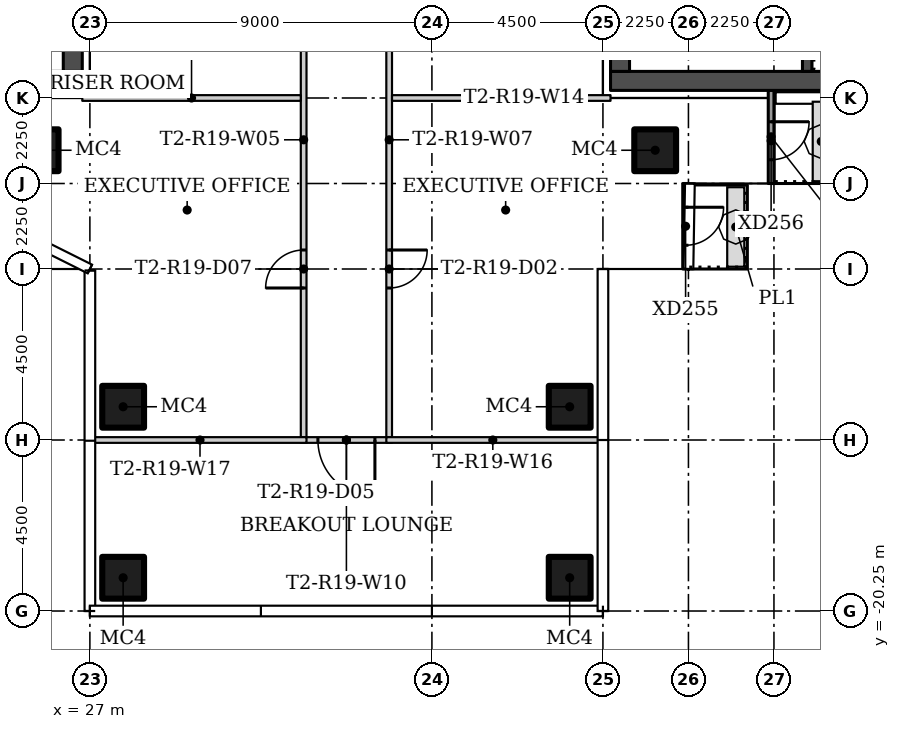
"""IFC4 building model, lengths in metres.
Left out: names, types, materials, properties, quantities, classifications, styles, units other than length and angle.
Written with IfcOpenShell. Run it as: python <this file> out.ifc"""

import sys

from ifc_helpers import new_model, si_unit, direction, frame, frame_2d, origin, origin_2d, place, context, subcontext, project, spatial, rectangle, hollow_rectangle, extrude, element, fill, save


model = new_model("IFC4")
c1 = context("Model", 3, precision=1e-05, world=origin(), true_north=direction((0.0, 1.0)))
c2 = subcontext(c1, "Body", "Model", "MODEL_VIEW")
j1 = project(units=[si_unit("LENGTHUNIT", "METRE"), si_unit("PLANEANGLEUNIT", "RADIAN")], contexts=[c1])
p1 = place(None, origin())
s1 = spatial("IfcSite", under=j1, at=p1, CompositionType="ELEMENT")
p2 = place(p1, origin())
s2 = spatial("IfcBuilding", under=s1, at=p2, CompositionType="ELEMENT")
p3 = place(p2, frame((0.0, 0.0, 170.1)))
s3 = spatial("IfcBuildingStorey", under=s2, at=p3, CompositionType="ELEMENT", Elevation=170.1)
for number, where in (
    (1, (25.625, -8.125, 0.0)),
    (2, (41.875, -8.125, 0.0)),
    (3, (39.625, -14.875, 0.0)),
    (4, (39.625, -19.375, 0.0)),
    (5, (27.875, -14.875, 0.0)),
    (6, (27.875, -19.375, 0.0)),
):
    element("IfcColumn", number, at=place(p3, frame(where)), inside=s3, PredefinedType="COLUMN", context=c2, shape_type="SweptSolid", body=[
        extrude(hollow_rectangle(XDim=1.1, YDim=1.1, WallThickness=0.04, at=origin_2d()), origin(), (0.0, 0.0, 1.0), 3.55),
    ])
p4 = place(p3, frame((32.625, -15.675, 0.0), z_axis=(0.0, 0.0, 1.0), x_axis=(0.0, 1.0, 0.0)))
e7 = element("IfcWall", 7, at=p4, inside=s3, PredefinedType="PARTITIONING", context=c2, shape_type="SweptSolid", body=[
    extrude(rectangle(XDim=15.65, YDim=0.15, at=frame_2d((7.825, 0.0))), origin(), (0.0, 0.0, 1.0), 3.55),
])
p5 = place(p4, frame((11.875, 0.0, 0.0)))
e8 = element("IfcOpeningElement", 8, at=p5, cuts=e7, PredefinedType="OPENING", context=c2, shape_type="SweptSolid", body=[
    extrude(rectangle(XDim=0.9, YDim=2.1, at=frame_2d((0.45, 1.05))), frame((0.0, 0.085, 0.0), z_axis=(0.0, -1.0, 0.0), x_axis=(1.0, 0.0, 0.0)), (0.0, 0.0, 1.0), 0.17),
])
p6 = place(p4, frame((3.925, 0.0, 0.0)))
e9 = element("IfcOpeningElement", 9, at=p6, cuts=e7, PredefinedType="OPENING", context=c2, shape_type="SweptSolid", body=[
    extrude(rectangle(XDim=1.0, YDim=2.4, at=frame_2d((0.5, 1.2))), frame((0.0, 0.085, 0.0), z_axis=(0.0, -1.0, 0.0), x_axis=(1.0, 0.0, 0.0)), (0.0, 0.0, 1.0), 0.17),
])
p7 = place(p3, frame((34.875, -0.025, 0.0), z_axis=(0.0, 0.0, 1.0), x_axis=(0.0, -1.0, 0.0)))
e10 = element("IfcWall", 10, at=p7, inside=s3, PredefinedType="PARTITIONING", context=c2, shape_type="SweptSolid", body=[
    extrude(rectangle(XDim=15.65, YDim=0.15, at=frame_2d((7.825, 0.0))), origin(), (0.0, 0.0, 1.0), 3.55),
])
p8 = place(p7, frame((10.725, 0.0, 0.0)))
e11 = element("IfcOpeningElement", 11, at=p8, cuts=e10, PredefinedType="OPENING", context=c2, shape_type="SweptSolid", body=[
    extrude(rectangle(XDim=1.0, YDim=2.4, at=frame_2d((0.5, 1.2))), frame((0.0, 0.085, 0.0), z_axis=(0.0, -1.0, 0.0), x_axis=(1.0, 0.0, 0.0)), (0.0, 0.0, 1.0), 0.17),
])
p9 = place(p7, frame((2.875, 0.0, 0.0)))
e12 = element("IfcOpeningElement", 12, at=p9, cuts=e10, PredefinedType="OPENING", context=c2, shape_type="SweptSolid", body=[
    extrude(rectangle(XDim=0.9, YDim=2.1, at=frame_2d((0.45, 1.05))), frame((0.0, 0.085, 0.0), z_axis=(0.0, -1.0, 0.0), x_axis=(1.0, 0.0, 0.0)), (0.0, 0.0, 1.0), 0.17),
])
p10 = place(p3, frame((34.95, -15.75, 0.0), z_axis=(0.0, 0.0, 1.0), x_axis=(-1.0, 0.0, 0.0)))
e13 = element("IfcWall", 13, at=p10, inside=s3, PredefinedType="PARTITIONING", context=c2, shape_type="SweptSolid", body=[
    extrude(rectangle(XDim=2.4, YDim=0.15, at=frame_2d((1.2, 0.0))), origin(), (0.0, 0.0, 1.0), 3.55),
])
p11 = place(p10, frame((0.45, 0.0, 0.0)))
e14 = element("IfcOpeningElement", 14, at=p11, cuts=e13, PredefinedType="OPENING", context=c2, shape_type="SweptSolid", body=[
    extrude(rectangle(XDim=1.5, YDim=2.1, at=frame_2d((0.75, 1.05))), frame((0.0, 0.085, 0.0), z_axis=(0.0, -1.0, 0.0), x_axis=(1.0, 0.0, 0.0)), (0.0, 0.0, 1.0), 0.17),
])
for number, where in (
    (15, (34.95, -6.75, 0.0)),
    (16, (26.8, -6.75, 0.0)),
):
    element("IfcWall", number, at=place(p3, frame(where)), inside=s3, PredefinedType="PARTITIONING", context=c2, shape_type="SweptSolid", body=[
        extrude(rectangle(XDim=5.75, YDim=0.15, at=frame_2d((2.875, 0.0))), origin(), (0.0, 0.0, 1.0), 3.55),
    ])
for number, where in (
    (17, (34.8, -15.75, 0.0)),
    (18, (27.095, -15.75, 0.0)),
):
    element("IfcWall", number, at=place(p3, frame(where)), inside=s3, PredefinedType="PARTITIONING", context=c2, shape_type="SweptSolid", body=[
        extrude(rectangle(XDim=5.605, YDim=0.15, at=frame_2d((2.802, 0.0))), origin(), (0.0, 0.0, 1.0), 3.55),
    ])
p12 = place(p3, frame((42.675, -9.0, 0.0), z_axis=(0.0, 0.0, 1.0), x_axis=(0.0, -1.0, 0.0)))
e19 = element("IfcWall", 19, at=p12, inside=s3, PredefinedType="SOLIDWALL", context=c2, shape_type="SweptSolid", body=[
    extrude(rectangle(XDim=2.25, YDim=0.15, at=frame_2d((1.125, 0.0))), origin(), (0.0, 0.0, 1.0), 3.45),
])
p13 = place(p12, frame((0.625, 0.0, 0.0)))
e20 = element("IfcOpeningElement", 20, at=p13, cuts=e19, PredefinedType="OPENING", context=c2, shape_type="SweptSolid", body=[
    extrude(rectangle(XDim=1.0, YDim=2.4, at=frame_2d((0.5, 1.2))), frame((0.0, 0.085, 0.0), z_axis=(0.0, -1.0, 0.0), x_axis=(1.0, 0.0, 0.0)), (0.0, 0.0, 1.0), 0.17),
])
p14 = place(p3, frame((44.925, -6.543, 0.0), z_axis=(0.0, 0.0, 1.0), x_axis=(0.0, -1.0, 0.0)))
e21 = element("IfcWall", 21, at=p14, inside=s3, PredefinedType="SOLIDWALL", context=c2, shape_type="SweptSolid", body=[
    extrude(rectangle(XDim=2.457, YDim=0.15, at=frame_2d((1.229, 0.0))), origin(), (0.0, 0.0, 1.0), 3.45),
])
p15 = place(p14, frame((0.832, 0.0, 0.0)))
e22 = element("IfcOpeningElement", 22, at=p15, cuts=e21, PredefinedType="OPENING", context=c2, shape_type="SweptSolid", body=[
    extrude(rectangle(XDim=1.0, YDim=2.4, at=frame_2d((0.5, 1.2))), frame((0.0, 0.085, 0.0), z_axis=(0.0, -1.0, 0.0), x_axis=(1.0, 0.0, 0.0)), (0.0, 0.0, 1.0), 0.17),
])
p16 = place(p3, frame((13.7, -6.3, 0.0)))
e23 = element("IfcWall", 23, at=p16, inside=s3, PredefinedType="SHEAR", context=c2, shape_type="SweptSolid", body=[
    extrude(rectangle(XDim=13.1, YDim=0.5, at=frame_2d((6.55, 0.0))), origin(), (0.0, 0.0, 1.0), 3.55),
])
p17 = place(p3, frame((26.55, 6.05, 0.0), z_axis=(0.0, 0.0, 1.0), x_axis=(0.0, -1.0, 0.0)))
e24 = element("IfcWall", 24, at=p17, inside=s3, PredefinedType="SHEAR", context=c2, shape_type="SweptSolid", body=[
    extrude(rectangle(XDim=12.1, YDim=0.5, at=frame_2d((6.05, 0.0))), origin(), (0.0, 0.0, 1.0), 3.55),
])
p18 = place(p17, frame((10.1, 0.0, 0.0)))
e25 = element("IfcOpeningElement", 25, at=p18, cuts=e24, PredefinedType="OPENING", context=c2, shape_type="SweptSolid", body=[
    extrude(rectangle(XDim=1.2, YDim=2.1, at=frame_2d((0.6, 1.05))), frame((0.0, 0.26, 0.0), z_axis=(0.0, -1.0, 0.0), x_axis=(1.0, 0.0, 0.0)), (0.0, 0.0, 1.0), 0.52),
])
p19 = place(p17, frame((3.9, 0.0, 0.0)))
e26 = element("IfcOpeningElement", 26, at=p19, cuts=e24, PredefinedType="OPENING", context=c2, shape_type="SweptSolid", body=[
    extrude(rectangle(XDim=1.8, YDim=2.4, at=frame_2d((0.9, 1.2))), frame((0.0, 0.26, 0.0), z_axis=(0.0, -1.0, 0.0), x_axis=(1.0, 0.0, 0.0)), (0.0, 0.0, 1.0), 0.52),
])
p20 = place(p3, frame((53.8, -6.3, 0.0), z_axis=(0.0, 0.0, 1.0), x_axis=(-1.0, 0.0, 0.0)))
e27 = element("IfcWall", 27, at=p20, inside=s3, PredefinedType="SHEAR", context=c2, shape_type="SweptSolid", body=[
    extrude(rectangle(XDim=13.1, YDim=0.5, at=frame_2d((6.55, 0.0))), origin(), (0.0, 0.0, 1.0), 3.55),
])
p21 = place(p3, frame((40.95, -6.05, 0.0), z_axis=(0.0, 0.0, 1.0), x_axis=(0.0, 1.0, 0.0)))
e28 = element("IfcWall", 28, at=p21, inside=s3, PredefinedType="SHEAR", context=c2, shape_type="SweptSolid", body=[
    extrude(rectangle(XDim=12.1, YDim=0.5, at=frame_2d((6.05, 0.0))), origin(), (0.0, 0.0, 1.0), 3.55),
])
p22 = place(p21, frame((0.8, 0.0, 0.0)))
e29 = element("IfcOpeningElement", 29, at=p22, cuts=e28, PredefinedType="OPENING", context=c2, shape_type="SweptSolid", body=[
    extrude(rectangle(XDim=1.2, YDim=2.1, at=frame_2d((0.6, 1.05))), frame((0.0, 0.26, 0.0), z_axis=(0.0, -1.0, 0.0), x_axis=(1.0, 0.0, 0.0)), (0.0, 0.0, 1.0), 0.52),
])
p23 = place(p21, frame((6.4, 0.0, 0.0)))
e30 = element("IfcOpeningElement", 30, at=p23, cuts=e28, PredefinedType="OPENING", context=c2, shape_type="SweptSolid", body=[
    extrude(rectangle(XDim=1.8, YDim=2.4, at=frame_2d((0.9, 1.2))), frame((0.0, 0.26, 0.0), z_axis=(0.0, -1.0, 0.0), x_axis=(1.0, 0.0, 0.0)), (0.0, 0.0, 1.0), 0.52),
])
p24 = place(p3, frame((45.875, -6.05, 0.0), z_axis=(0.0, 0.0, 1.0), x_axis=(0.0, 1.0, 0.0)))
e31 = element("IfcWall", 31, at=p24, inside=s3, PredefinedType="SHEAR", context=c2, shape_type="SweptSolid", body=[
    extrude(rectangle(XDim=2.55, YDim=0.25, at=frame_2d((1.275, 0.0))), origin(), (0.0, 0.0, 1.0), 3.55),
])
p25 = place(p8, origin())
e32 = element("IfcDoor", 32, at=p25, inside=s3, OperationType="SINGLE_SWING_RIGHT", PredefinedType="DOOR", context=c2, shape_type="SweptSolid", body=[
    extrude(rectangle(XDim=1.0, YDim=2.4, at=frame_2d((0.5, 1.2))), frame((0.0, 0.025, 0.0), z_axis=(0.0, -1.0, 0.0), x_axis=(1.0, 0.0, 0.0)), (0.0, 0.0, 1.0), 0.05),
])
fill(e11, e32)
p26 = place(p11, origin())
e33 = element("IfcDoor", 33, at=p26, inside=s3, OperationType="DOUBLE_DOOR_SINGLE_SWING", PredefinedType="DOOR", context=c2, shape_type="SweptSolid", body=[
    extrude(rectangle(XDim=1.5, YDim=2.1, at=frame_2d((0.75, 1.05))), frame((0.0, 0.025, 0.0), z_axis=(0.0, -1.0, 0.0), x_axis=(1.0, 0.0, 0.0)), (0.0, 0.0, 1.0), 0.05),
])
fill(e14, e33)
p27 = place(p6, origin())
e34 = element("IfcDoor", 34, at=p27, inside=s3, OperationType="SINGLE_SWING_LEFT", PredefinedType="DOOR", context=c2, shape_type="SweptSolid", body=[
    extrude(rectangle(XDim=1.0, YDim=2.4, at=frame_2d((0.5, 1.2))), frame((0.0, 0.025, 0.0), z_axis=(0.0, -1.0, 0.0), x_axis=(1.0, 0.0, 0.0)), (0.0, 0.0, 1.0), 0.05),
])
fill(e9, e34)
p28 = place(p13, origin())
e35 = element("IfcDoor", 35, at=p28, inside=s3, OperationType="SINGLE_SWING_LEFT", PredefinedType="DOOR", context=c2, shape_type="SweptSolid", body=[
    extrude(rectangle(XDim=1.0, YDim=2.4, at=frame_2d((0.5, 1.2))), frame((0.0, 0.025, 0.0), z_axis=(0.0, -1.0, 0.0), x_axis=(1.0, 0.0, 0.0)), (0.0, 0.0, 1.0), 0.05),
])
fill(e20, e35)
p29 = place(p15, origin())
e36 = element("IfcDoor", 36, at=p29, inside=s3, OperationType="SINGLE_SWING_RIGHT", PredefinedType="DOOR", context=c2, shape_type="SweptSolid", body=[
    extrude(rectangle(XDim=1.0, YDim=2.4, at=frame_2d((0.5, 1.2))), frame((0.0, 0.025, 0.0), z_axis=(0.0, -1.0, 0.0), x_axis=(1.0, 0.0, 0.0)), (0.0, 0.0, 1.0), 0.05),
])
fill(e22, e36)
save(model, sys.argv[1])
